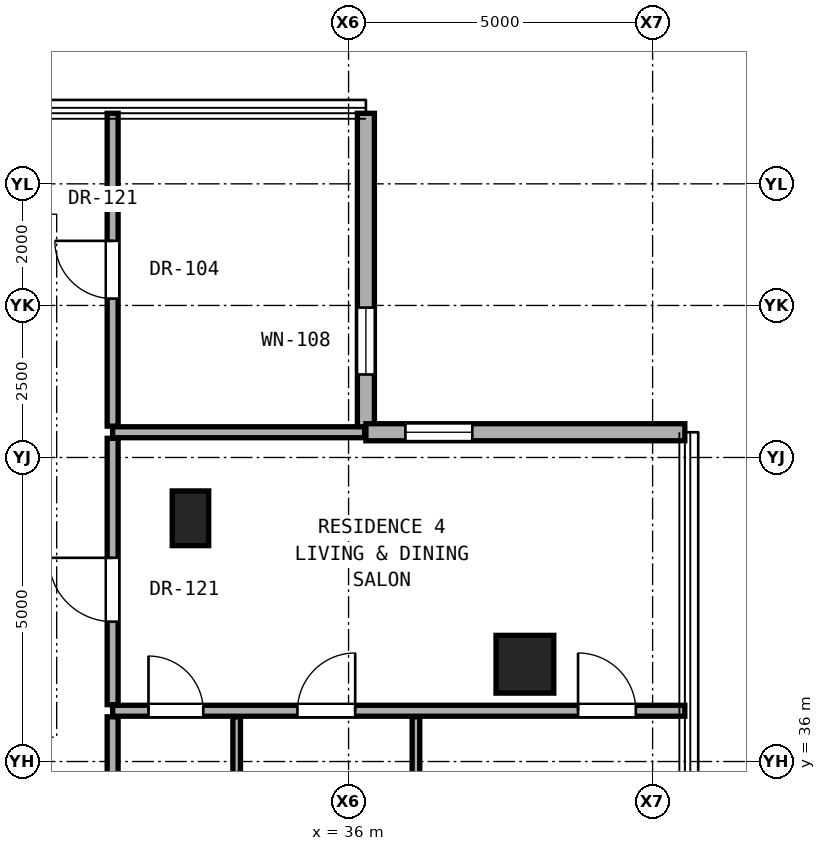
"""IFC4 building model, lengths in metres.
Left out: names, types, materials, properties, quantities, classifications, styles, units other than length and angle.
Written with IfcOpenShell. Run it as: python <this file> out.ifc"""

import sys

from ifc_helpers import new_model, si_unit, direction, frame, frame_2d, origin, origin_2d, place, context, subcontext, project, spatial, rectangle, hollow_rectangle, extrude, element, fill, save


model = new_model("IFC4")
c1 = context("Model", 3, precision=1e-05, world=origin(), true_north=direction((0.0, 1.0)))
c2 = subcontext(c1, "Body", "Model", "MODEL_VIEW")
j1 = project(units=[si_unit("LENGTHUNIT", "METRE"), si_unit("PLANEANGLEUNIT", "RADIAN")], contexts=[c1])
p1 = place(None, origin())
s1 = spatial("IfcSite", under=j1, at=p1, CompositionType="ELEMENT")
p2 = place(p1, origin())
s2 = spatial("IfcBuilding", under=s1, at=p2, CompositionType="ELEMENT")
p3 = place(p2, frame((0.0, 0.0, 170.65)))
s3 = spatial("IfcBuildingStorey", under=s2, at=p3, CompositionType="ELEMENT", Elevation=170.65)
p4 = place(p3, frame((38.9, 37.6, 0.0), z_axis=(0.0, 0.0, 1.0), x_axis=(1.0, 0.0, 0.0)))
e1 = element("IfcColumn", 1, at=p4, inside=s3, PredefinedType="COLUMN", context=c2, shape_type="SweptSolid", body=[
    extrude(hollow_rectangle(XDim=0.95, YDim=0.95, WallThickness=0.05, at=origin_2d()), origin(), (0.0, 0.0, 1.0), 3.25),
])
p5 = place(p3, frame((33.4, 40.0, 0.0), z_axis=(0.0, 0.0, 1.0), x_axis=(1.0, 0.0, 0.0)))
e2 = element("IfcColumn", 2, at=p5, inside=s3, PredefinedType="PILASTER", context=c2, shape_type="SweptSolid", body=[
    extrude(rectangle(XDim=0.6, YDim=0.9, at=origin_2d()), origin(), (0.0, 0.0, 1.0), 3.25),
])
p6 = place(p3, frame((36.285, 41.415, 0.0), z_axis=(0.0, 0.0, 1.0), x_axis=(0.0, 1.0, 0.0)))
e3 = element("IfcWall", 3, at=p6, inside=s3, PredefinedType="SOLIDWALL", context=c2, shape_type="SweptSolid", body=[
    extrude(rectangle(XDim=5.245, YDim=0.28, at=frame_2d((2.623, 0.0))), origin(), (0.0, 0.0, 1.0), 3.03),
])
p7 = place(p6, frame((0.95, 0.0, 0.85)))
e4 = element("IfcOpeningElement", 4, at=p7, cuts=e3, PredefinedType="OPENING", context=c2, shape_type="SweptSolid", body=[
    extrude(rectangle(XDim=1.1, YDim=2.0, at=frame_2d((0.55, 1.0))), frame((0.0, 0.15, 0.0), z_axis=(0.0, -1.0, 0.0), x_axis=(1.0, 0.0, 0.0)), (0.0, 0.0, 1.0), 0.3),
])
p8 = place(p3, frame((41.53, 41.415, 0.0), z_axis=(0.0, 0.0, 1.0), x_axis=(-1.0, 0.0, 0.0)))
e5 = element("IfcWall", 5, at=p8, inside=s3, PredefinedType="SOLIDWALL", context=c2, shape_type="SweptSolid", body=[
    extrude(rectangle(XDim=5.245, YDim=0.28, at=frame_2d((2.623, 0.0))), origin(), (0.0, 0.0, 1.0), 3.03),
])
p9 = place(p8, frame((3.495, 0.0, 0.85)))
e6 = element("IfcOpeningElement", 6, at=p9, cuts=e5, PredefinedType="OPENING", context=c2, shape_type="SweptSolid", body=[
    extrude(rectangle(XDim=1.1, YDim=2.0, at=frame_2d((0.55, 1.0))), frame((0.0, 0.15, 0.0), z_axis=(0.0, -1.0, 0.0), x_axis=(1.0, 0.0, 0.0)), (0.0, 0.0, 1.0), 0.3),
])
p10 = place(p3, frame((32.12, 36.835, 0.0), z_axis=(0.0, 0.0, 1.0), x_axis=(1.0, 0.0, 0.0)))
e7 = element("IfcWall", 7, at=p10, inside=s3, PredefinedType="PARTITIONING", context=c2, shape_type="SweptSolid", body=[
    extrude(rectangle(XDim=9.41, YDim=0.18, at=frame_2d((4.705, 0.0))), origin(), (0.0, 0.0, 1.0), 2.269),
])
p11 = place(p10, frame((7.654, 0.0, 0.0)))
e8 = element("IfcOpeningElement", 8, at=p11, cuts=e7, PredefinedType="OPENING", context=c2, shape_type="SweptSolid", body=[
    extrude(rectangle(XDim=0.95, YDim=2.15, at=frame_2d((0.475, 1.075))), frame((0.0, 0.1, 0.0), z_axis=(0.0, -1.0, 0.0), x_axis=(1.0, 0.0, 0.0)), (0.0, 0.0, 1.0), 0.2),
])
p12 = place(p10, frame((3.039, 0.0, 0.0)))
e9 = element("IfcOpeningElement", 9, at=p12, cuts=e7, PredefinedType="OPENING", context=c2, shape_type="SweptSolid", body=[
    extrude(rectangle(XDim=0.95, YDim=2.15, at=frame_2d((0.475, 1.075))), frame((0.0, 0.1, 0.0), z_axis=(0.0, -1.0, 0.0), x_axis=(1.0, 0.0, 0.0)), (0.0, 0.0, 1.0), 0.2),
])
p13 = place(p10, frame((0.59, 0.0, 0.0)))
e10 = element("IfcOpeningElement", 10, at=p13, cuts=e7, PredefinedType="OPENING", context=c2, shape_type="SweptSolid", body=[
    extrude(rectangle(XDim=0.9, YDim=2.1, at=frame_2d((0.45, 1.05))), frame((0.0, 0.1, 0.0), z_axis=(0.0, -1.0, 0.0), x_axis=(1.0, 0.0, 0.0)), (0.0, 0.0, 1.0), 0.2),
])
p14 = place(p3, frame((32.12, 41.415, 0.0), z_axis=(0.0, 0.0, 1.0), x_axis=(1.0, 0.0, 0.0)))
e11 = element("IfcWall", 11, at=p14, inside=s3, PredefinedType="PARTITIONING", context=c2, shape_type="SweptSolid", body=[
    extrude(rectangle(XDim=4.145, YDim=0.18, at=frame_2d((2.072, 0.0))), origin(), (0.0, 0.0, 1.0), 3.05),
])
p15 = place(p3, frame((32.12, 34.215, 0.0), z_axis=(0.0, 0.0, 1.0), x_axis=(0.0, 1.0, 0.0)))
e12 = element("IfcWall", 12, at=p15, inside=s3, PredefinedType="PARTITIONING", context=c2, shape_type="SweptSolid", body=[
    extrude(rectangle(XDim=2.52, YDim=0.18, at=frame_2d((1.26, 0.0))), origin(), (0.0, 0.0, 1.0), 3.05),
])
p16 = place(p3, frame((32.12, 36.935, 0.0), z_axis=(0.0, 0.0, 1.0), x_axis=(0.0, 1.0, 0.0)))
e13 = element("IfcWall", 13, at=p16, inside=s3, PredefinedType="PARTITIONING", context=c2, shape_type="SweptSolid", body=[
    extrude(rectangle(XDim=4.38, YDim=0.18, at=frame_2d((2.19, 0.0))), origin(), (0.0, 0.0, 1.0), 2.442),
])
p17 = place(p16, frame((1.365, 0.0, 0.0)))
e14 = element("IfcOpeningElement", 14, at=p17, cuts=e13, PredefinedType="OPENING", context=c2, shape_type="SweptSolid", body=[
    extrude(rectangle(XDim=1.05, YDim=2.2, at=frame_2d((0.525, 1.1))), frame((0.0, 0.1, 0.0), z_axis=(0.0, -1.0, 0.0), x_axis=(1.0, 0.0, 0.0)), (0.0, 0.0, 1.0), 0.2),
])
p18 = place(p3, frame((32.12, 41.515, 0.0), z_axis=(0.0, 0.0, 1.0), x_axis=(0.0, 1.0, 0.0)))
e15 = element("IfcWall", 15, at=p18, inside=s3, PredefinedType="PARTITIONING", context=c2, shape_type="SweptSolid", body=[
    extrude(rectangle(XDim=5.145, YDim=0.18, at=frame_2d((2.573, 0.0))), origin(), (0.0, 0.0, 1.0), 3.05),
])
p19 = place(p18, frame((2.097, 0.0, 0.0)))
e16 = element("IfcOpeningElement", 16, at=p19, cuts=e15, PredefinedType="OPENING", context=c2, shape_type="SweptSolid", body=[
    extrude(rectangle(XDim=0.95, YDim=2.15, at=frame_2d((0.475, 1.075))), frame((0.0, 0.1, 0.0), z_axis=(0.0, -1.0, 0.0), x_axis=(1.0, 0.0, 0.0)), (0.0, 0.0, 1.0), 0.2),
])
for number, where, z_axis, x_axis in (
    (17, (34.16, 34.215, 0.0), (0.0, 0.0, 1.0), (0.0, 1.0, 0.0)),
    (18, (37.108, 34.215, 0.0), (0.0, 0.0, 1.0), (0.0, 1.0, 0.0)),
):
    element("IfcWall", number, at=place(p3, frame(where, z_axis=z_axis, x_axis=x_axis)), inside=s3, PredefinedType="PARTITIONING", context=c2, shape_type="SweptSolid", body=[
        extrude(rectangle(XDim=2.52, YDim=0.125, at=frame_2d((1.26, 0.0))), origin(), (0.0, 0.0, 1.0), 3.05),
    ])
p20 = place(p7, origin())
e19 = element("IfcWindow", 19, at=p20, inside=s3, PartitioningType="SINGLE_PANEL", PredefinedType="WINDOW", context=c2, shape_type="SweptSolid", body=[
    extrude(rectangle(XDim=1.1, YDim=2.0, at=frame_2d((0.55, 1.0))), frame((0.0, 0.03, 0.0), z_axis=(0.0, -1.0, 0.0), x_axis=(1.0, 0.0, 0.0)), (0.0, 0.0, 1.0), 0.06),
])
fill(e4, e19)
p21 = place(p9, origin())
e20 = element("IfcWindow", 20, at=p21, inside=s3, PartitioningType="SINGLE_PANEL", PredefinedType="WINDOW", context=c2, shape_type="SweptSolid", body=[
    extrude(rectangle(XDim=1.1, YDim=2.0, at=frame_2d((0.55, 1.0))), frame((0.0, 0.03, 0.0), z_axis=(0.0, -1.0, 0.0), x_axis=(1.0, 0.0, 0.0)), (0.0, 0.0, 1.0), 0.06),
])
fill(e6, e20)
p22 = place(p17, origin())
e21 = element("IfcDoor", 21, at=p22, inside=s3, OperationType="SINGLE_SWING_RIGHT", PredefinedType="DOOR", context=c2, shape_type="SweptSolid", body=[
    extrude(rectangle(XDim=1.05, YDim=2.2, at=frame_2d((0.525, 1.1))), frame((0.0, 0.025, 0.0), z_axis=(0.0, -1.0, 0.0), x_axis=(1.0, 0.0, 0.0)), (0.0, 0.0, 1.0), 0.05),
])
fill(e14, e21)
p23 = place(p11, origin())
e22 = element("IfcDoor", 22, at=p23, inside=s3, OperationType="SINGLE_SWING_LEFT", PredefinedType="DOOR", context=c2, shape_type="SweptSolid", body=[
    extrude(rectangle(XDim=0.95, YDim=2.15, at=frame_2d((0.475, 1.075))), frame((0.0, 0.025, 0.0), z_axis=(0.0, -1.0, 0.0), x_axis=(1.0, 0.0, 0.0)), (0.0, 0.0, 1.0), 0.05),
])
fill(e8, e22)
p24 = place(p12, origin())
e23 = element("IfcDoor", 23, at=p24, inside=s3, OperationType="SINGLE_SWING_RIGHT", PredefinedType="DOOR", context=c2, shape_type="SweptSolid", body=[
    extrude(rectangle(XDim=0.95, YDim=2.15, at=frame_2d((0.475, 1.075))), frame((0.0, 0.025, 0.0), z_axis=(0.0, -1.0, 0.0), x_axis=(1.0, 0.0, 0.0)), (0.0, 0.0, 1.0), 0.05),
])
fill(e9, e23)
p25 = place(p13, origin())
e24 = element("IfcDoor", 24, at=p25, inside=s3, OperationType="SINGLE_SWING_LEFT", PredefinedType="DOOR", context=c2, shape_type="SweptSolid", body=[
    extrude(rectangle(XDim=0.9, YDim=2.1, at=frame_2d((0.45, 1.05))), frame((0.0, 0.025, 0.0), z_axis=(0.0, -1.0, 0.0), x_axis=(1.0, 0.0, 0.0)), (0.0, 0.0, 1.0), 0.05),
])
fill(e10, e24)
p26 = place(p19, origin())
e25 = element("IfcDoor", 25, at=p26, inside=s3, OperationType="SINGLE_SWING_RIGHT", PredefinedType="DOOR", context=c2, shape_type="SweptSolid", body=[
    extrude(rectangle(XDim=0.95, YDim=2.15, at=frame_2d((0.475, 1.075))), frame((0.0, 0.025, 0.0), z_axis=(0.0, -1.0, 0.0), x_axis=(1.0, 0.0, 0.0)), (0.0, 0.0, 1.0), 0.05),
])
fill(e16, e25)
save(model, sys.argv[1])
